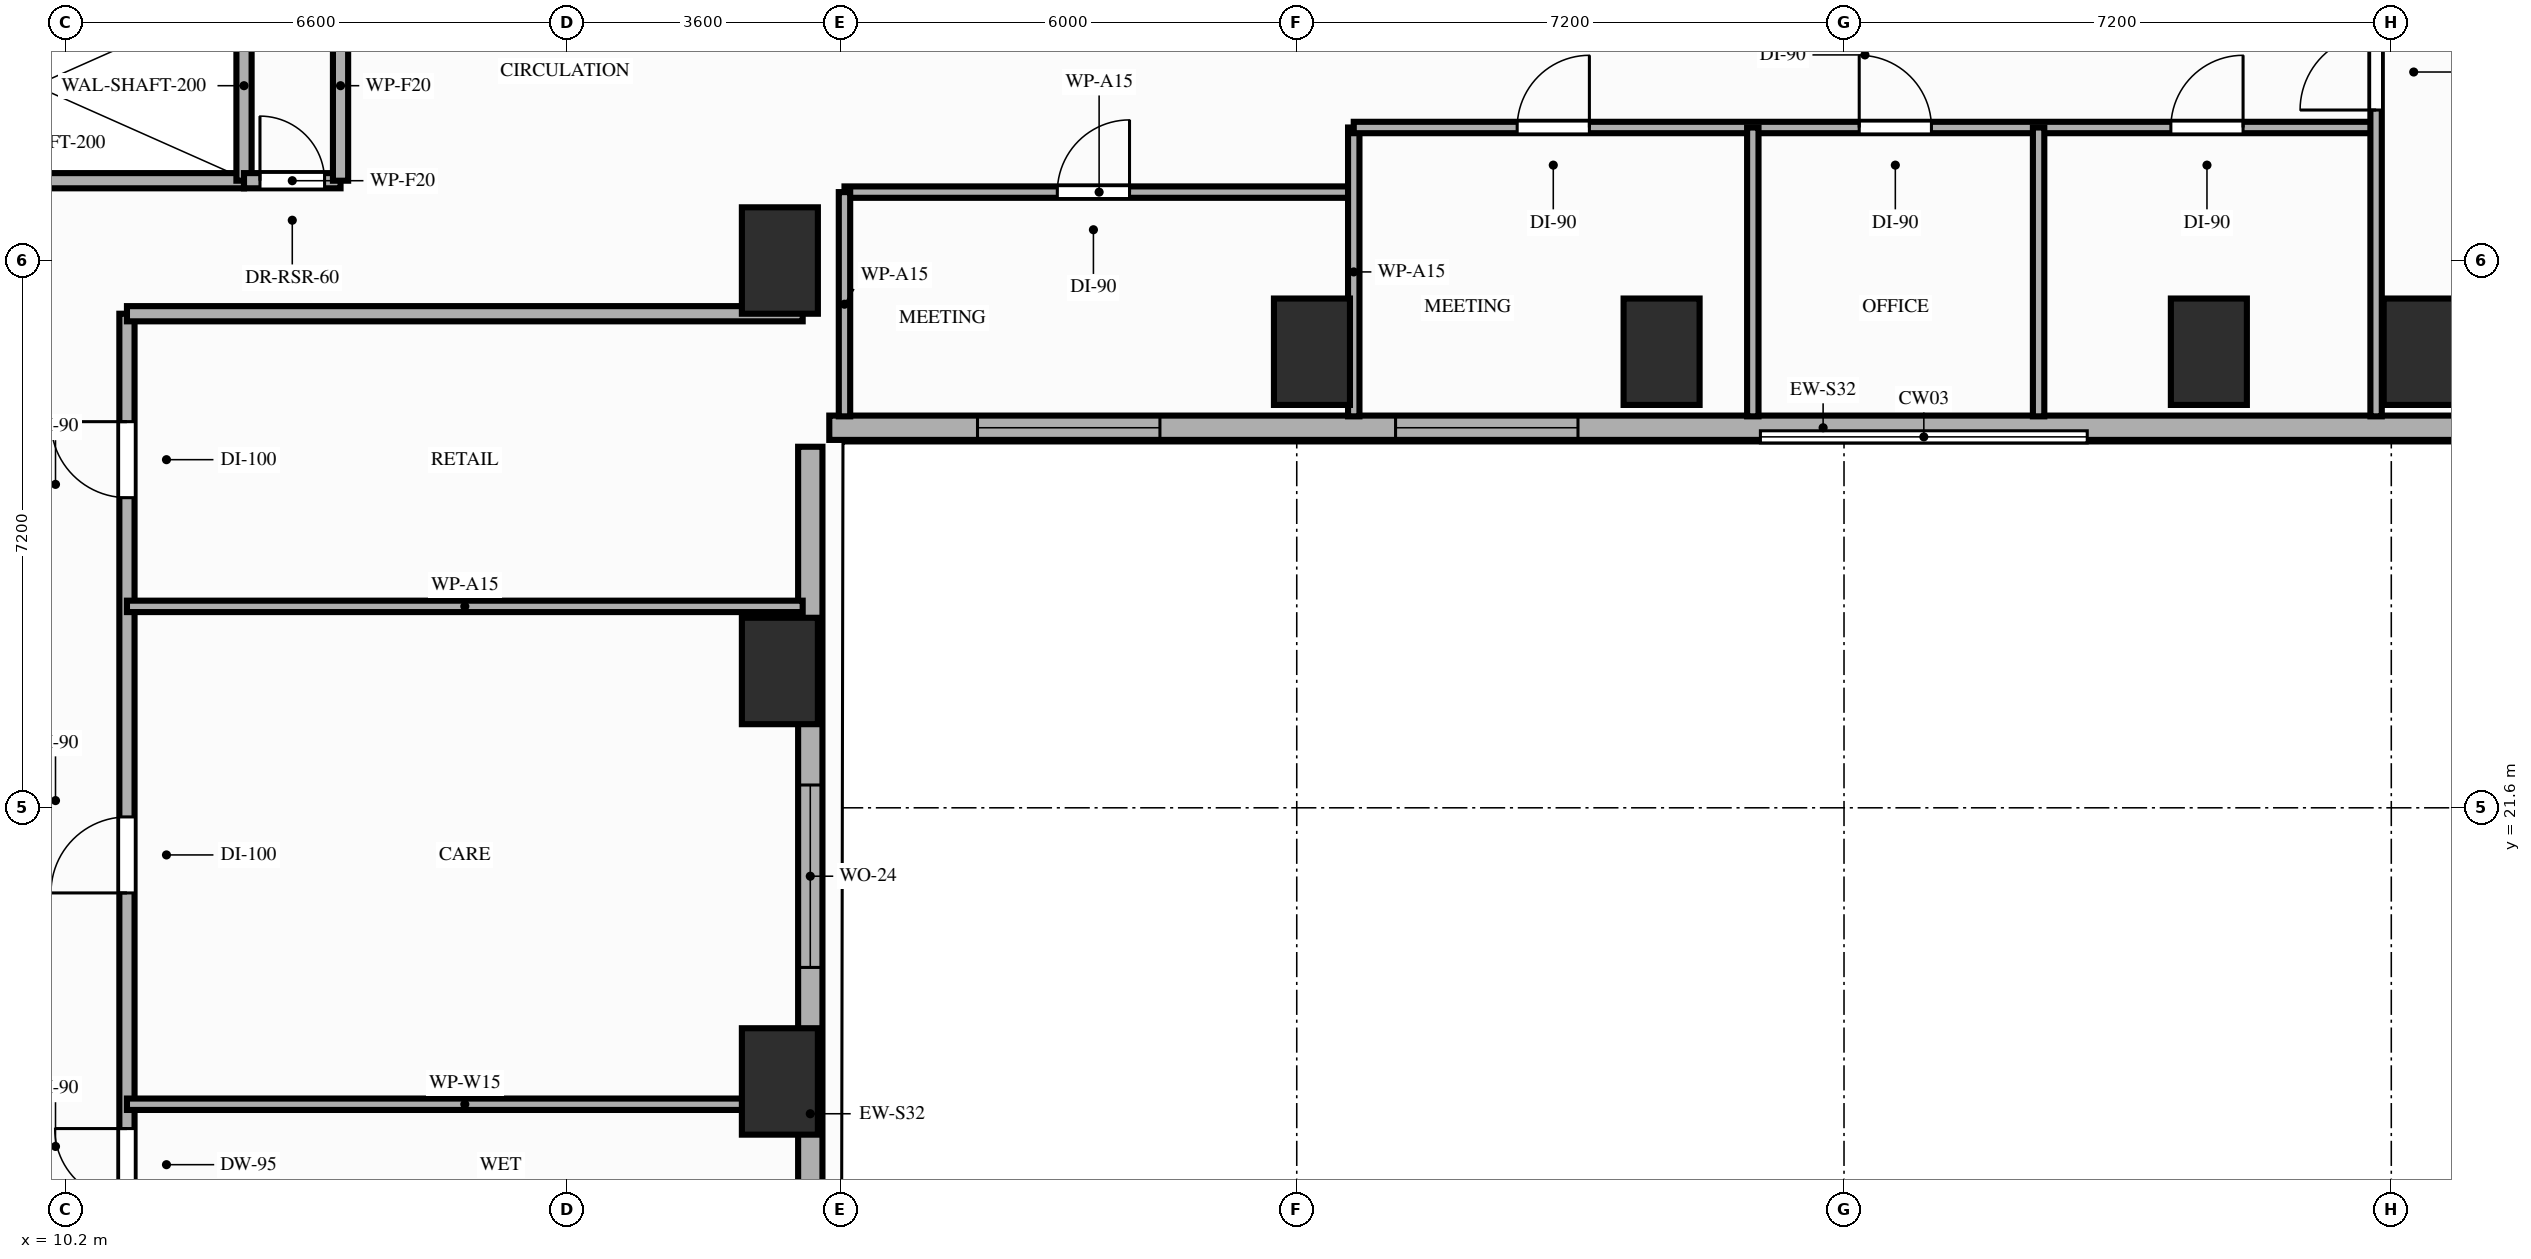
"""IFC4 building model, lengths in metres.
Left out: names, types, materials, properties, quantities, classifications, styles, units other than length and angle.
Written with IfcOpenShell. Run it as: python <this file> out.ifc"""

import sys

from ifc_helpers import new_model, si_unit, direction, frame, frame_2d, origin, origin_2d, place, context, subcontext, project, spatial, rectangle, extrude, element, fill, save


model = new_model("IFC4")
c1 = context("Model", 3, precision=1e-05, world=origin(), true_north=direction((0.0, 1.0)))
c2 = subcontext(c1, "Body", "Model", "MODEL_VIEW")
j1 = project(units=[si_unit("LENGTHUNIT", "METRE"), si_unit("PLANEANGLEUNIT", "RADIAN")], contexts=[c1])
p1 = place(None, origin())
s1 = spatial("IfcSite", under=j1, at=p1, CompositionType="ELEMENT")
p2 = place(p1, origin())
s2 = spatial("IfcBuilding", under=s1, at=p2, CompositionType="ELEMENT")
p3 = place(p2, frame((0.0, 0.0, 50.0)))
s3 = spatial("IfcBuildingStorey", under=s2, at=p3, CompositionType="ELEMENT", Elevation=50.0)
for number, where, z_axis, x_axis in (
    (1, (19.6, 18.0, 0.0), (0.0, 0.0, 1.0), (1.0, 0.0, 0.0)),
    (2, (19.6, 23.4, 0.0), (0.0, 0.0, 1.0), (1.0, 0.0, 0.0)),
    (3, (19.6, 28.8, 0.0), (0.0, 0.0, 1.0), (1.0, 0.0, 0.0)),
    (4, (26.6, 27.6, 0.0), (0.0, 0.0, 1.0), (1.0, 0.0, 0.0)),
    (5, (31.2, 27.6, 0.0), (0.0, 0.0, 1.0), (1.0, 0.0, 0.0)),
    (6, (38.4, 27.6, 0.0), (0.0, 0.0, 1.0), (1.0, 0.0, 0.0)),
    (7, (41.2, 27.6, 0.0), (0.0, 0.0, 1.0), (1.0, 0.0, 0.0)),
):
    element("IfcColumn", number, at=place(p3, frame(where, z_axis=z_axis, x_axis=x_axis)), inside=s3, PredefinedType="COLUMN", context=c2, shape_type="SweptSolid", body=[
        extrude(rectangle(XDim=1.0, YDim=1.4, at=origin_2d()), origin(), (0.0, 0.0, 1.0), 3.2),
    ])
p4 = place(p3, frame((20.0, 8.8, 0.0), z_axis=(0.0, 0.0, 1.0), x_axis=(0.0, 1.0, 0.0)))
e8 = element("IfcWall", 8, at=p4, inside=s3, PredefinedType="STANDARD", context=c2, shape_type="SweptSolid", body=[
    extrude(rectangle(XDim=17.55, YDim=0.32, at=frame_2d((8.775, 0.0))), origin(), (0.0, 0.0, 1.0), 2.41),
])
p5 = place(p4, frame((10.7, 0.0, 0.85)))
e9 = element("IfcOpeningElement", 9, at=p5, cuts=e8, PredefinedType="OPENING", context=c2, shape_type="SweptSolid", body=[
    extrude(rectangle(XDim=2.4, YDim=1.31, at=frame_2d((1.2, 0.655))), frame((0.0, 0.17, 0.0), z_axis=(0.0, -1.0, 0.0), x_axis=(1.0, 0.0, 0.0)), (0.0, 0.0, 1.0), 0.34),
])
p6 = place(p4, frame((5.95, 0.0, 0.85)))
e10 = element("IfcOpeningElement", 10, at=p6, cuts=e8, PredefinedType="OPENING", context=c2, shape_type="SweptSolid", body=[
    extrude(rectangle(XDim=1.1, YDim=1.31, at=frame_2d((0.55, 0.655))), frame((0.0, 0.17, 0.0), z_axis=(0.0, -1.0, 0.0), x_axis=(1.0, 0.0, 0.0)), (0.0, 0.0, 1.0), 0.34),
])
p7 = place(p3, frame((20.25, 26.6, 0.0), z_axis=(0.0, 0.0, 1.0), x_axis=(1.0, 0.0, 0.0)))
e11 = element("IfcWall", 11, at=p7, inside=s3, PredefinedType="STANDARD", context=c2, shape_type="SweptSolid", body=[
    extrude(rectangle(XDim=26.15, YDim=0.32, at=frame_2d((13.075, 0.0))), origin(), (0.0, 0.0, 1.0), 3.02),
])
p8 = place(p7, frame((1.95, 0.0, 0.85)))
e12 = element("IfcOpeningElement", 12, at=p8, cuts=e11, PredefinedType="OPENING", context=c2, shape_type="SweptSolid", body=[
    extrude(rectangle(XDim=2.4, YDim=1.8, at=frame_2d((1.2, 0.9))), frame((0.0, 0.17, 0.0), z_axis=(0.0, -1.0, 0.0), x_axis=(1.0, 0.0, 0.0)), (0.0, 0.0, 1.0), 0.34),
])
p9 = place(p7, frame((7.45, 0.0, 0.85)))
e13 = element("IfcOpeningElement", 13, at=p9, cuts=e11, PredefinedType="OPENING", context=c2, shape_type="SweptSolid", body=[
    extrude(rectangle(XDim=2.4, YDim=1.8, at=frame_2d((1.2, 0.9))), frame((0.0, 0.17, 0.0), z_axis=(0.0, -1.0, 0.0), x_axis=(1.0, 0.0, 0.0)), (0.0, 0.0, 1.0), 0.34),
])
p10 = place(p7, frame((21.95, 0.0, 0.85)))
e14 = element("IfcOpeningElement", 14, at=p10, cuts=e11, PredefinedType="OPENING", context=c2, shape_type="SweptSolid", body=[
    extrude(rectangle(XDim=2.4, YDim=1.8, at=frame_2d((1.2, 0.9))), frame((0.0, 0.17, 0.0), z_axis=(0.0, -1.0, 0.0), x_axis=(1.0, 0.0, 0.0)), (0.0, 0.0, 1.0), 0.34),
])
p11 = place(p3, frame((7.0, 29.85, 0.0), z_axis=(0.0, 0.0, 1.0), x_axis=(1.0, 0.0, 0.0)))
e15 = element("IfcWall", 15, at=p11, inside=s3, PredefinedType="MOVABLE", context=c2, shape_type="SweptSolid", body=[
    extrude(rectangle(XDim=5.55, YDim=0.2, at=frame_2d((2.775, 0.0))), origin(), (0.0, 0.0, 1.0), 3.02),
])
p12 = place(p3, frame((12.55, 29.85, 0.0), z_axis=(0.0, 0.0, 1.0), x_axis=(0.0, 1.0, 0.0)))
e16 = element("IfcWall", 16, at=p12, inside=s3, PredefinedType="MOVABLE", context=c2, shape_type="SweptSolid", body=[
    extrude(rectangle(XDim=2.5, YDim=0.2, at=frame_2d((1.25, 0.0))), origin(), (0.0, 0.0, 1.0), 3.02),
])
p13 = place(p3, frame((12.55, 29.85, 0.0), z_axis=(0.0, 0.0, 1.0), x_axis=(1.0, 0.0, 0.0)))
e17 = element("IfcWall", 17, at=p13, inside=s3, PredefinedType="PARTITIONING", context=c2, shape_type="SweptSolid", body=[
    extrude(rectangle(XDim=1.27, YDim=0.2, at=frame_2d((0.635, 0.0))), origin(), (0.0, 0.0, 1.0), 3.02),
])
p14 = place(p13, frame((0.21, 0.0, 0.0)))
e18 = element("IfcOpeningElement", 18, at=p14, cuts=e17, PredefinedType="OPENING", context=c2, shape_type="SweptSolid", body=[
    extrude(rectangle(XDim=0.85, YDim=2.05, at=frame_2d((0.425, 1.025))), frame((0.0, 0.11, 0.0), z_axis=(0.0, -1.0, 0.0), x_axis=(1.0, 0.0, 0.0)), (0.0, 0.0, 1.0), 0.22),
])
p15 = place(p3, frame((13.82, 29.85, 0.0), z_axis=(0.0, 0.0, 1.0), x_axis=(0.0, 1.0, 0.0)))
e19 = element("IfcWall", 19, at=p15, inside=s3, PredefinedType="PARTITIONING", context=c2, shape_type="SweptSolid", body=[
    extrude(rectangle(XDim=2.5, YDim=0.2, at=frame_2d((1.25, 0.0))), origin(), (0.0, 0.0, 1.0), 3.02),
])
p16 = place(p3, frame((11.01, 14.5, 0.0), z_axis=(0.0, 0.0, 1.0), x_axis=(0.0, 1.0, 0.0)))
e20 = element("IfcWall", 20, at=p16, inside=s3, PredefinedType="PARTITIONING", context=c2, shape_type="SweptSolid", body=[
    extrude(rectangle(XDim=13.6, YDim=0.2, at=frame_2d((6.8, 0.0))), origin(), (0.0, 0.0, 1.0), 2.41),
])
p17 = place(p16, frame((0.45, 0.0, 0.0)))
e21 = element("IfcOpeningElement", 21, at=p17, cuts=e20, PredefinedType="OPENING", context=c2, shape_type="SweptSolid", body=[
    extrude(rectangle(XDim=0.85, YDim=2.1, at=frame_2d((0.425, 1.05))), frame((0.0, 0.11, 0.0), z_axis=(0.0, -1.0, 0.0), x_axis=(1.0, 0.0, 0.0)), (0.0, 0.0, 1.0), 0.22),
])
p18 = place(p16, frame((1.93, 0.0, 0.0)))
e22 = element("IfcOpeningElement", 22, at=p18, cuts=e20, PredefinedType="OPENING", context=c2, shape_type="SweptSolid", body=[
    extrude(rectangle(XDim=0.95, YDim=2.1, at=frame_2d((0.475, 1.05))), frame((0.0, 0.11, 0.0), z_axis=(0.0, -1.0, 0.0), x_axis=(1.0, 0.0, 0.0)), (0.0, 0.0, 1.0), 0.22),
])
p19 = place(p16, frame((5.98, 0.0, 0.0)))
e23 = element("IfcOpeningElement", 23, at=p19, cuts=e20, PredefinedType="OPENING", context=c2, shape_type="SweptSolid", body=[
    extrude(rectangle(XDim=1.0, YDim=2.15, at=frame_2d((0.5, 1.075))), frame((0.0, 0.11, 0.0), z_axis=(0.0, -1.0, 0.0), x_axis=(1.0, 0.0, 0.0)), (0.0, 0.0, 1.0), 0.22),
])
p20 = place(p16, frame((11.18, 0.0, 0.0)))
e24 = element("IfcOpeningElement", 24, at=p20, cuts=e20, PredefinedType="OPENING", context=c2, shape_type="SweptSolid", body=[
    extrude(rectangle(XDim=1.0, YDim=2.15, at=frame_2d((0.5, 1.075))), frame((0.0, 0.11, 0.0), z_axis=(0.0, -1.0, 0.0), x_axis=(1.0, 0.0, 0.0)), (0.0, 0.0, 1.0), 0.22),
])
p21 = place(p3, frame((11.01, 28.1, 0.0), z_axis=(0.0, 0.0, 1.0), x_axis=(1.0, 0.0, 0.0)))
e25 = element("IfcWall", 25, at=p21, inside=s3, PredefinedType="PARTITIONING", context=c2, shape_type="SweptSolid", body=[
    extrude(rectangle(XDim=8.89, YDim=0.2, at=frame_2d((4.445, 0.0))), origin(), (0.0, 0.0, 1.0), 2.41),
])
p22 = place(p3, frame((20.45, 29.7, 0.0), z_axis=(0.0, 0.0, 1.0), x_axis=(1.0, 0.0, 0.0)))
e26 = element("IfcWall", 26, at=p22, inside=s3, PredefinedType="PARTITIONING", context=c2, shape_type="SweptSolid", body=[
    extrude(rectangle(XDim=6.7, YDim=0.15, at=frame_2d((3.35, 0.0))), origin(), (0.0, 0.0, 1.0), 3.02),
])
p23 = place(p22, frame((2.8, 0.0, 0.0)))
e27 = element("IfcOpeningElement", 27, at=p23, cuts=e26, PredefinedType="OPENING", context=c2, shape_type="SweptSolid", body=[
    extrude(rectangle(XDim=0.95, YDim=2.15, at=frame_2d((0.475, 1.075))), frame((0.0, 0.085, 0.0), z_axis=(0.0, -1.0, 0.0), x_axis=(1.0, 0.0, 0.0)), (0.0, 0.0, 1.0), 0.17),
])
p24 = place(p3, frame((20.45, 26.75, 0.0), z_axis=(0.0, 0.0, 1.0), x_axis=(0.0, 1.0, 0.0)))
e28 = element("IfcWall", 28, at=p24, inside=s3, PredefinedType="PARTITIONING", context=c2, shape_type="SweptSolid", body=[
    extrude(rectangle(XDim=2.95, YDim=0.15, at=frame_2d((1.475, 0.0))), origin(), (0.0, 0.0, 1.0), 2.41),
])
p25 = place(p3, frame((27.15, 26.75, 0.0), z_axis=(0.0, 0.0, 1.0), x_axis=(0.0, 1.0, 0.0)))
e29 = element("IfcWall", 29, at=p25, inside=s3, PredefinedType="PARTITIONING", context=c2, shape_type="SweptSolid", body=[
    extrude(rectangle(XDim=3.8, YDim=0.15, at=frame_2d((1.9, 0.0))), origin(), (0.0, 0.0, 1.0), 2.41),
])
for number, where, z_axis, x_axis in (
    (30, (11.01, 17.7, 0.0), (0.0, 0.0, 1.0), (1.0, 0.0, 0.0)),
    (31, (11.01, 24.25, 0.0), (0.0, 0.0, 1.0), (1.0, 0.0, 0.0)),
):
    element("IfcWall", number, at=place(p3, frame(where, z_axis=z_axis, x_axis=x_axis)), inside=s3, PredefinedType="PARTITIONING", context=c2, shape_type="SweptSolid", body=[
        extrude(rectangle(XDim=8.89, YDim=0.15, at=frame_2d((4.445, 0.0))), origin(), (0.0, 0.0, 1.0), 2.41),
    ])
p26 = place(p3, frame((27.15, 30.55, 0.0), z_axis=(0.0, 0.0, 1.0), x_axis=(1.0, 0.0, 0.0)))
e32 = element("IfcWall", 32, at=p26, inside=s3, PredefinedType="PARTITIONING", context=c2, shape_type="SweptSolid", body=[
    extrude(rectangle(XDim=13.45, YDim=0.15, at=frame_2d((6.725, 0.0))), origin(), (0.0, 0.0, 1.0), 2.41),
])
p27 = place(p26, frame((2.15, 0.0, 0.0)))
e33 = element("IfcOpeningElement", 33, at=p27, cuts=e32, PredefinedType="OPENING", context=c2, shape_type="SweptSolid", body=[
    extrude(rectangle(XDim=0.95, YDim=2.15, at=frame_2d((0.475, 1.075))), frame((0.0, 0.085, 0.0), z_axis=(0.0, -1.0, 0.0), x_axis=(1.0, 0.0, 0.0)), (0.0, 0.0, 1.0), 0.17),
])
p28 = place(p26, frame((6.65, 0.0, 0.0)))
e34 = element("IfcOpeningElement", 34, at=p28, cuts=e32, PredefinedType="OPENING", context=c2, shape_type="SweptSolid", body=[
    extrude(rectangle(XDim=0.95, YDim=2.15, at=frame_2d((0.475, 1.075))), frame((0.0, 0.085, 0.0), z_axis=(0.0, -1.0, 0.0), x_axis=(1.0, 0.0, 0.0)), (0.0, 0.0, 1.0), 0.17),
])
p29 = place(p26, frame((10.75, 0.0, 0.0)))
e35 = element("IfcOpeningElement", 35, at=p29, cuts=e32, PredefinedType="OPENING", context=c2, shape_type="SweptSolid", body=[
    extrude(rectangle(XDim=0.95, YDim=2.15, at=frame_2d((0.475, 1.075))), frame((0.0, 0.085, 0.0), z_axis=(0.0, -1.0, 0.0), x_axis=(1.0, 0.0, 0.0)), (0.0, 0.0, 1.0), 0.17),
])
p30 = place(p3, frame((40.6, 26.75, 0.0), z_axis=(0.0, 0.0, 1.0), x_axis=(0.0, 1.0, 0.0)))
e36 = element("IfcWall", 36, at=p30, inside=s3, PredefinedType="PARTITIONING", context=c2, shape_type="SweptSolid", body=[
    extrude(rectangle(XDim=15.45, YDim=0.15, at=frame_2d((7.725, 0.0))), origin(), (0.0, 0.0, 1.0), 2.41),
])
p31 = place(p30, frame((4.03, 0.0, 0.0)))
e37 = element("IfcOpeningElement", 37, at=p31, cuts=e36, PredefinedType="OPENING", context=c2, shape_type="SweptSolid", body=[
    extrude(rectangle(XDim=1.0, YDim=2.15, at=frame_2d((0.5, 1.075))), frame((0.0, 0.085, 0.0), z_axis=(0.0, -1.0, 0.0), x_axis=(1.0, 0.0, 0.0)), (0.0, 0.0, 1.0), 0.17),
])
for number, where, z_axis, x_axis in (
    (38, (32.4, 26.75, 0.0), (0.0, 0.0, 1.0), (0.0, 1.0, 0.0)),
    (39, (36.16, 26.75, 0.0), (0.0, 0.0, 1.0), (0.0, 1.0, 0.0)),
):
    element("IfcWall", number, at=place(p3, frame(where, z_axis=z_axis, x_axis=x_axis)), inside=s3, PredefinedType="PARTITIONING", context=c2, shape_type="SweptSolid", body=[
        extrude(rectangle(XDim=3.8, YDim=0.15, at=frame_2d((1.9, 0.0))), origin(), (0.0, 0.0, 1.0), 2.41),
    ])
p32 = place(p5, origin())
e40 = element("IfcWindow", 40, at=p32, inside=s3, PartitioningType="SINGLE_PANEL", PredefinedType="WINDOW", context=c2, shape_type="SweptSolid", body=[
    extrude(rectangle(XDim=2.4, YDim=1.31, at=frame_2d((1.2, 0.655))), frame((0.0, 0.03, 0.0), z_axis=(0.0, -1.0, 0.0), x_axis=(1.0, 0.0, 0.0)), (0.0, 0.0, 1.0), 0.06),
])
fill(e9, e40)
p33 = place(p8, origin())
e41 = element("IfcWindow", 41, at=p33, inside=s3, PartitioningType="SINGLE_PANEL", PredefinedType="WINDOW", context=c2, shape_type="SweptSolid", body=[
    extrude(rectangle(XDim=2.4, YDim=1.8, at=frame_2d((1.2, 0.9))), frame((0.0, 0.03, 0.0), z_axis=(0.0, -1.0, 0.0), x_axis=(1.0, 0.0, 0.0)), (0.0, 0.0, 1.0), 0.06),
])
fill(e12, e41)
p34 = place(p9, origin())
e42 = element("IfcWindow", 42, at=p34, inside=s3, PartitioningType="SINGLE_PANEL", PredefinedType="WINDOW", context=c2, shape_type="SweptSolid", body=[
    extrude(rectangle(XDim=2.4, YDim=1.8, at=frame_2d((1.2, 0.9))), frame((0.0, 0.03, 0.0), z_axis=(0.0, -1.0, 0.0), x_axis=(1.0, 0.0, 0.0)), (0.0, 0.0, 1.0), 0.06),
])
fill(e13, e42)
p35 = place(p14, origin())
e43 = element("IfcDoor", 43, at=p35, inside=s3, OperationType="SINGLE_SWING_LEFT", PredefinedType="DOOR", context=c2, shape_type="SweptSolid", body=[
    extrude(rectangle(XDim=0.85, YDim=2.05, at=frame_2d((0.425, 1.025))), frame((0.0, 0.025, 0.0), z_axis=(0.0, -1.0, 0.0), x_axis=(1.0, 0.0, 0.0)), (0.0, 0.0, 1.0), 0.05),
])
fill(e18, e43)
p36 = place(p23, origin())
e44 = element("IfcDoor", 44, at=p36, inside=s3, OperationType="SINGLE_SWING_RIGHT", PredefinedType="DOOR", context=c2, shape_type="SweptSolid", body=[
    extrude(rectangle(XDim=0.95, YDim=2.15, at=frame_2d((0.475, 1.075))), frame((0.0, 0.025, 0.0), z_axis=(0.0, -1.0, 0.0), x_axis=(1.0, 0.0, 0.0)), (0.0, 0.0, 1.0), 0.05),
])
fill(e27, e44)
p37 = place(p18, origin())
e45 = element("IfcDoor", 45, at=p37, inside=s3, OperationType="SINGLE_SWING_RIGHT", PredefinedType="DOOR", context=c2, shape_type="SweptSolid", body=[
    extrude(rectangle(XDim=0.95, YDim=2.1, at=frame_2d((0.475, 1.05))), frame((0.0, 0.025, 0.0), z_axis=(0.0, -1.0, 0.0), x_axis=(1.0, 0.0, 0.0)), (0.0, 0.0, 1.0), 0.05),
])
fill(e22, e45)
p38 = place(p19, origin())
e46 = element("IfcDoor", 46, at=p38, inside=s3, OperationType="SINGLE_SWING_LEFT", PredefinedType="DOOR", context=c2, shape_type="SweptSolid", body=[
    extrude(rectangle(XDim=1.0, YDim=2.15, at=frame_2d((0.5, 1.075))), frame((0.0, 0.025, 0.0), z_axis=(0.0, -1.0, 0.0), x_axis=(1.0, 0.0, 0.0)), (0.0, 0.0, 1.0), 0.05),
])
fill(e23, e46)
p39 = place(p20, origin())
e47 = element("IfcDoor", 47, at=p39, inside=s3, OperationType="SINGLE_SWING_RIGHT", PredefinedType="DOOR", context=c2, shape_type="SweptSolid", body=[
    extrude(rectangle(XDim=1.0, YDim=2.15, at=frame_2d((0.5, 1.075))), frame((0.0, 0.025, 0.0), z_axis=(0.0, -1.0, 0.0), x_axis=(1.0, 0.0, 0.0)), (0.0, 0.0, 1.0), 0.05),
])
fill(e24, e47)
p40 = place(p31, origin())
e48 = element("IfcDoor", 48, at=p40, inside=s3, OperationType="SINGLE_SWING_LEFT", PredefinedType="DOOR", context=c2, shape_type="SweptSolid", body=[
    extrude(rectangle(XDim=1.0, YDim=2.15, at=frame_2d((0.5, 1.075))), frame((0.0, 0.025, 0.0), z_axis=(0.0, -1.0, 0.0), x_axis=(1.0, 0.0, 0.0)), (0.0, 0.0, 1.0), 0.05),
])
fill(e37, e48)
p41 = place(p27, origin())
e49 = element("IfcDoor", 49, at=p41, inside=s3, OperationType="SINGLE_SWING_RIGHT", PredefinedType="DOOR", context=c2, shape_type="SweptSolid", body=[
    extrude(rectangle(XDim=0.95, YDim=2.15, at=frame_2d((0.475, 1.075))), frame((0.0, 0.025, 0.0), z_axis=(0.0, -1.0, 0.0), x_axis=(1.0, 0.0, 0.0)), (0.0, 0.0, 1.0), 0.05),
])
fill(e33, e49)
p42 = place(p28, origin())
e50 = element("IfcDoor", 50, at=p42, inside=s3, OperationType="SINGLE_SWING_LEFT", PredefinedType="DOOR", context=c2, shape_type="SweptSolid", body=[
    extrude(rectangle(XDim=0.95, YDim=2.15, at=frame_2d((0.475, 1.075))), frame((0.0, 0.025, 0.0), z_axis=(0.0, -1.0, 0.0), x_axis=(1.0, 0.0, 0.0)), (0.0, 0.0, 1.0), 0.05),
])
fill(e34, e50)
p43 = place(p29, origin())
e51 = element("IfcDoor", 51, at=p43, inside=s3, OperationType="SINGLE_SWING_RIGHT", PredefinedType="DOOR", context=c2, shape_type="SweptSolid", body=[
    extrude(rectangle(XDim=0.95, YDim=2.15, at=frame_2d((0.475, 1.075))), frame((0.0, 0.025, 0.0), z_axis=(0.0, -1.0, 0.0), x_axis=(1.0, 0.0, 0.0)), (0.0, 0.0, 1.0), 0.05),
])
fill(e35, e51)
save(model, sys.argv[1])
